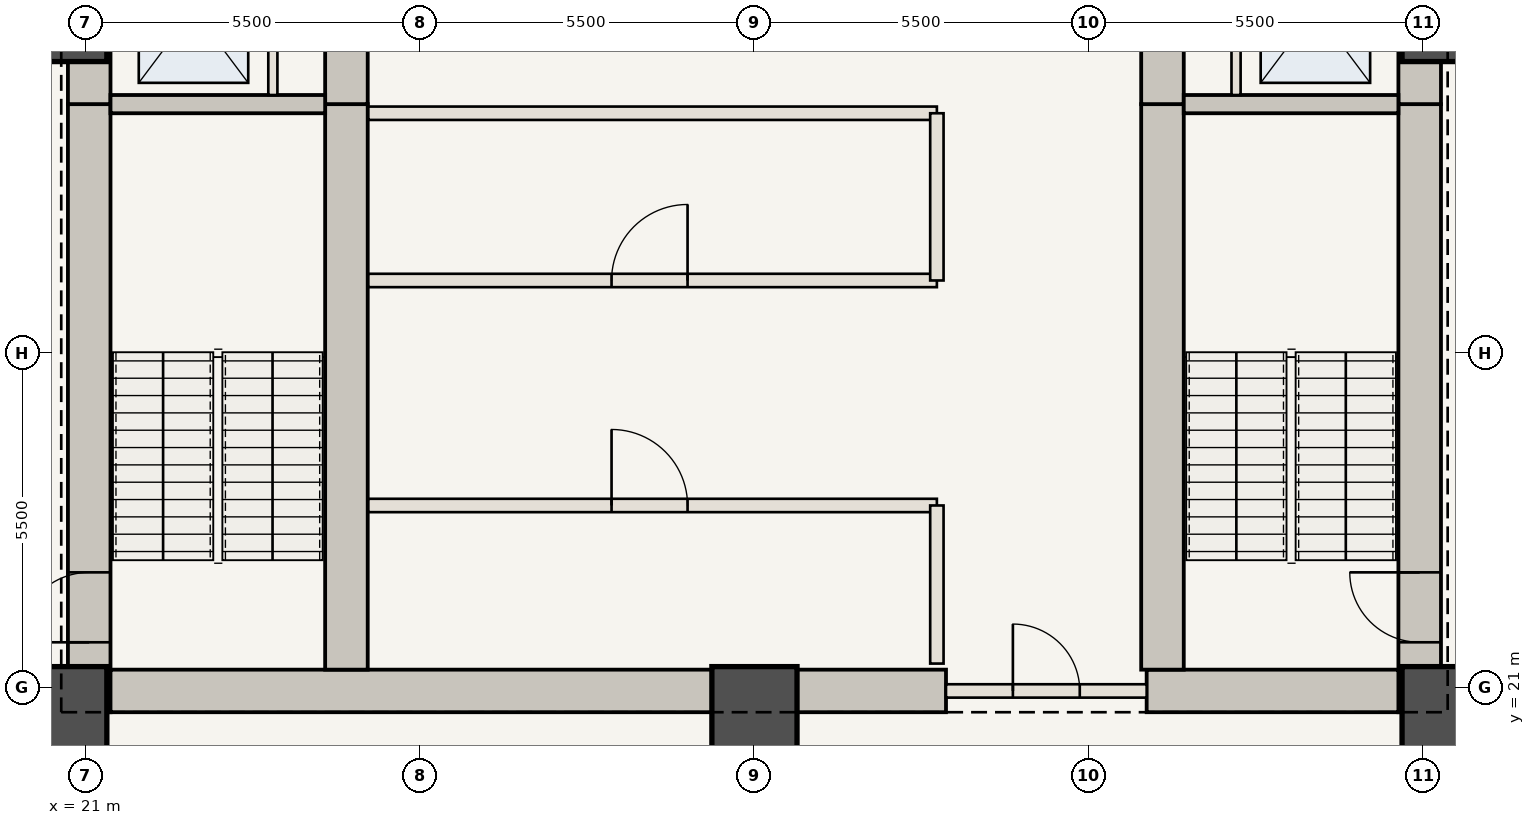
"""IFC4 building model, lengths in metres.
Left out: names, types, materials, properties, quantities, classifications, styles, units other than length and angle.
Written with IfcOpenShell. Run it as: python <this file> out.ifc"""

import sys

from ifc_helpers import new_model, si_unit, direction, frame, frame_2d, origin, origin_2d, place, context, subcontext, project, spatial, rectangle, extrude, element, fill, save


model = new_model("IFC4")
c1 = context("Model", 3, precision=1e-05, world=origin(), true_north=direction((0.0, 1.0)))
c2 = subcontext(c1, "Body", "Model", "MODEL_VIEW")
j1 = project(units=[si_unit("LENGTHUNIT", "METRE"), si_unit("PLANEANGLEUNIT", "RADIAN")], contexts=[c1])
p1 = place(None, origin())
s1 = spatial("IfcSite", under=j1, at=p1, CompositionType="ELEMENT")
p2 = place(p1, origin())
s2 = spatial("IfcBuilding", under=s1, at=p2, CompositionType="ELEMENT")
p3 = place(p2, frame((0.0, 0.0, -9.1)))
s3 = spatial("IfcBuildingStorey", under=s2, at=p3, CompositionType="ELEMENT", Elevation=-9.1)
p4 = place(p3, frame((21.06, 20.6, -0.6), z_axis=(0.0, 0.0, 1.0), x_axis=(0.0, 1.0, 0.0)))
e1 = element("IfcWall", 1, at=p4, inside=s3, PredefinedType="SHEAR", context=c2, shape_type="SweptSolid", body=[
    extrude(rectangle(XDim=10.0, YDim=0.7, at=frame_2d((5.0, 0.0))), origin(), (0.0, 0.0, 1.0), 5.15),
])
p5 = place(p4, frame((1.15, 0.0, 0.6)))
e2 = element("IfcOpeningElement", 2, at=p5, cuts=e1, PredefinedType="OPENING", context=c2, shape_type="SweptSolid", body=[
    extrude(rectangle(XDim=1.15, YDim=2.15, at=frame_2d((0.575, 1.075))), frame((0.0, 0.36, 0.0), z_axis=(0.0, -1.0, 0.0), x_axis=(1.0, 0.0, 0.0)), (0.0, 0.0, 1.0), 0.72),
])
p6 = place(p3, frame((21.06, 30.6, -0.6), z_axis=(0.0, 0.0, 1.0), x_axis=(0.0, 1.0, 0.0)))
e3 = element("IfcWall", 3, at=p6, inside=s3, PredefinedType="SHEAR", context=c2, shape_type="SweptSolid", body=[
    extrude(rectangle(XDim=12.75, YDim=0.7, at=frame_2d((6.375, 0.0))), origin(), (0.0, 0.0, 1.0), 5.15),
])
p7 = place(p6, frame((4.2, 0.0, 0.6)))
e4 = element("IfcOpeningElement", 4, at=p7, cuts=e3, PredefinedType="OPENING", context=c2, shape_type="SweptSolid", body=[
    extrude(rectangle(XDim=1.1, YDim=2.15, at=frame_2d((0.55, 1.075))), frame((0.0, 0.36, 0.0), z_axis=(0.0, -1.0, 0.0), x_axis=(1.0, 0.0, 0.0)), (0.0, 0.0, 1.0), 0.72),
])
p8 = place(p6, frame((9.2, 0.0, 0.6)))
e5 = element("IfcOpeningElement", 5, at=p8, cuts=e3, PredefinedType="OPENING", context=c2, shape_type="SweptSolid", body=[
    extrude(rectangle(XDim=0.92, YDim=2.1, at=frame_2d((0.46, 1.05))), frame((0.0, 0.36, 0.0), z_axis=(0.0, -1.0, 0.0), x_axis=(1.0, 0.0, 0.0)), (0.0, 0.0, 1.0), 0.72),
])
p9 = place(p3, frame((42.94, 20.6, -0.6), z_axis=(0.0, 0.0, 1.0), x_axis=(0.0, 1.0, 0.0)))
e6 = element("IfcWall", 6, at=p9, inside=s3, PredefinedType="SHEAR", context=c2, shape_type="SweptSolid", body=[
    extrude(rectangle(XDim=10.0, YDim=0.7, at=frame_2d((5.0, 0.0))), origin(), (0.0, 0.0, 1.0), 5.15),
])
p10 = place(p9, frame((1.15, 0.0, 0.6)))
e7 = element("IfcOpeningElement", 7, at=p10, cuts=e6, PredefinedType="OPENING", context=c2, shape_type="SweptSolid", body=[
    extrude(rectangle(XDim=1.15, YDim=2.15, at=frame_2d((0.575, 1.075))), frame((0.0, 0.36, 0.0), z_axis=(0.0, -1.0, 0.0), x_axis=(1.0, 0.0, 0.0)), (0.0, 0.0, 1.0), 0.72),
])
p11 = place(p3, frame((42.94, 30.6, -0.6), z_axis=(0.0, 0.0, 1.0), x_axis=(0.0, 1.0, 0.0)))
e8 = element("IfcWall", 8, at=p11, inside=s3, PredefinedType="SHEAR", context=c2, shape_type="SweptSolid", body=[
    extrude(rectangle(XDim=12.75, YDim=0.7, at=frame_2d((6.375, 0.0))), origin(), (0.0, 0.0, 1.0), 5.15),
])
p12 = place(p11, frame((4.2, 0.0, 0.6)))
e9 = element("IfcOpeningElement", 9, at=p12, cuts=e8, PredefinedType="OPENING", context=c2, shape_type="SweptSolid", body=[
    extrude(rectangle(XDim=1.1, YDim=2.15, at=frame_2d((0.55, 1.075))), frame((0.0, 0.36, 0.0), z_axis=(0.0, -1.0, 0.0), x_axis=(1.0, 0.0, 0.0)), (0.0, 0.0, 1.0), 0.72),
])
p13 = place(p11, frame((8.4, 0.0, 0.6)))
e10 = element("IfcOpeningElement", 10, at=p13, cuts=e8, PredefinedType="OPENING", context=c2, shape_type="SweptSolid", body=[
    extrude(rectangle(XDim=0.88, YDim=2.1, at=frame_2d((0.44, 1.05))), frame((0.0, 0.36, 0.0), z_axis=(0.0, -1.0, 0.0), x_axis=(1.0, 0.0, 0.0)), (0.0, 0.0, 1.0), 0.72),
])
p14 = place(p11, frame((10.5, 0.0, 0.6)))
e11 = element("IfcOpeningElement", 11, at=p14, cuts=e8, PredefinedType="OPENING", context=c2, shape_type="SweptSolid", body=[
    extrude(rectangle(XDim=0.88, YDim=2.1, at=frame_2d((0.44, 1.05))), frame((0.0, 0.36, 0.0), z_axis=(0.0, -1.0, 0.0), x_axis=(1.0, 0.0, 0.0)), (0.0, 0.0, 1.0), 0.72),
])
p15 = place(p3, frame((21.41, 20.95, -0.6), z_axis=(0.0, 0.0, 1.0), x_axis=(1.0, 0.0, 0.0)))
e12 = element("IfcWall", 12, at=p15, inside=s3, PredefinedType="SHEAR", context=c2, shape_type="SweptSolid", body=[
    extrude(rectangle(XDim=13.74, YDim=0.7, at=frame_2d((6.87, 0.0))), origin(), (0.0, 0.0, 1.0), 5.15),
])
p16 = place(p3, frame((38.45, 20.95, -0.6), z_axis=(0.0, 0.0, 1.0), x_axis=(1.0, 0.0, 0.0)))
e13 = element("IfcWall", 13, at=p16, inside=s3, PredefinedType="SHEAR", context=c2, shape_type="SweptSolid", body=[
    extrude(rectangle(XDim=4.14, YDim=0.7, at=frame_2d((2.07, 0.0))), origin(), (0.0, 0.0, 1.0), 5.15),
])
p17 = place(p3, frame((25.29, 21.3, -0.6), z_axis=(0.0, 0.0, 1.0), x_axis=(0.0, 1.0, 0.0)))
e14 = element("IfcWall", 14, at=p17, inside=s3, PredefinedType="SHEAR", context=c2, shape_type="SweptSolid", body=[
    extrude(rectangle(XDim=9.3, YDim=0.7, at=frame_2d((4.65, 0.0))), origin(), (0.0, 0.0, 1.0), 5.15),
])
p18 = place(p3, frame((25.29, 30.6, -0.6), z_axis=(0.0, 0.0, 1.0), x_axis=(0.0, 1.0, 0.0)))
e15 = element("IfcWall", 15, at=p18, inside=s3, PredefinedType="SHEAR", context=c2, shape_type="SweptSolid", body=[
    extrude(rectangle(XDim=12.05, YDim=0.7, at=frame_2d((6.025, 0.0))), origin(), (0.0, 0.0, 1.0), 5.15),
])
p19 = place(p18, frame((6.25, 0.0, 0.6)))
e16 = element("IfcOpeningElement", 16, at=p19, cuts=e15, PredefinedType="OPENING", context=c2, shape_type="SweptSolid", body=[
    extrude(rectangle(XDim=1.1, YDim=2.15, at=frame_2d((0.55, 1.075))), frame((0.0, 0.36, 0.0), z_axis=(0.0, -1.0, 0.0), x_axis=(1.0, 0.0, 0.0)), (0.0, 0.0, 1.0), 0.72),
])
p20 = place(p3, frame((38.71, 21.3, -0.6), z_axis=(0.0, 0.0, 1.0), x_axis=(0.0, 1.0, 0.0)))
e17 = element("IfcWall", 17, at=p20, inside=s3, PredefinedType="SHEAR", context=c2, shape_type="SweptSolid", body=[
    extrude(rectangle(XDim=9.3, YDim=0.7, at=frame_2d((4.65, 0.0))), origin(), (0.0, 0.0, 1.0), 5.15),
])
p21 = place(p3, frame((38.71, 30.6, -0.6), z_axis=(0.0, 0.0, 1.0), x_axis=(0.0, 1.0, 0.0)))
e18 = element("IfcWall", 18, at=p21, inside=s3, PredefinedType="SHEAR", context=c2, shape_type="SweptSolid", body=[
    extrude(rectangle(XDim=12.05, YDim=0.7, at=frame_2d((6.025, 0.0))), origin(), (0.0, 0.0, 1.0), 5.15),
])
for number, where, z_axis, x_axis in (
    (19, (20.65, 20.65, -0.6), (0.0, 0.0, 1.0), (1.0, 0.0, 0.0)),
    (20, (32.0, 20.65, -0.6), (0.0, 0.0, 1.0), (1.0, 0.0, 0.0)),
    (21, (43.35, 20.65, -0.6), (0.0, 0.0, 1.0), (1.0, 0.0, 0.0)),
    (22, (43.35, 32.0, -0.6), (0.0, 0.0, 1.0), (1.0, 0.0, 0.0)),
    (23, (20.65, 32.0, -0.6), (0.0, 0.0, 1.0), (1.0, 0.0, 0.0)),
):
    element("IfcColumn", number, at=place(p3, frame(where, z_axis=z_axis, x_axis=x_axis)), inside=s3, PredefinedType="COLUMN", context=c2, shape_type="SweptSolid", body=[
        extrude(rectangle(XDim=1.4, YDim=1.4, at=origin_2d()), origin(), (0.0, 0.0, 1.0), 5.15),
    ])
for number, where, z_axis, x_axis in (
    (24, (21.41, 30.6, 0.0), (0.0, 0.0, 1.0), (1.0, 0.0, 0.0)),
    (25, (39.06, 30.6, 0.0), (0.0, 0.0, 1.0), (1.0, 0.0, 0.0)),
):
    element("IfcWall", number, at=place(p3, frame(where, z_axis=z_axis, x_axis=x_axis)), inside=s3, PredefinedType="SHEAR", context=c2, shape_type="SweptSolid", body=[
        extrude(rectangle(XDim=3.53, YDim=0.3, at=frame_2d((1.765, 0.0))), origin(), (0.0, 0.0, 1.0), 4.25),
    ])
for number, where, z_axis, x_axis in (
    (26, (24.08, 30.75, 0.0), (0.0, 0.0, 1.0), (0.0, 1.0, 0.0)),
    (27, (39.92, 30.75, 0.0), (0.0, 0.0, 1.0), (0.0, 1.0, 0.0)),
):
    element("IfcWall", number, at=place(p3, frame(where, z_axis=z_axis, x_axis=x_axis)), inside=s3, PredefinedType="STANDARD", context=c2, shape_type="SweptSolid", body=[
        extrude(rectangle(XDim=2.65, YDim=0.15, at=frame_2d((1.325, 0.0))), origin(), (0.0, 0.0, 1.0), 4.25),
    ])
p22 = place(p3, frame((35.15, 20.95, 0.0), z_axis=(0.0, 0.0, 1.0), x_axis=(1.0, 0.0, 0.0)))
e28 = element("IfcWall", 28, at=p22, inside=s3, PredefinedType="STANDARD", context=c2, shape_type="SweptSolid", body=[
    extrude(rectangle(XDim=3.3, YDim=0.22, at=frame_2d((1.65, 0.0))), origin(), (0.0, 0.0, 1.0), 4.25),
])
p23 = place(p22, frame((1.1, 0.0, 0.0)))
e29 = element("IfcOpeningElement", 29, at=p23, cuts=e28, PredefinedType="OPENING", context=c2, shape_type="SweptSolid", body=[
    extrude(rectangle(XDim=1.1, YDim=2.15, at=frame_2d((0.55, 1.075))), frame((0.0, 0.12, 0.0), z_axis=(0.0, -1.0, 0.0), x_axis=(1.0, 0.0, 0.0)), (0.0, 0.0, 1.0), 0.24),
])
p24 = place(p3, frame((25.65, 24.0, 0.0), z_axis=(0.0, 0.0, 1.0), x_axis=(1.0, 0.0, 0.0)))
e30 = element("IfcWall", 30, at=p24, inside=s3, PredefinedType="STANDARD", context=c2, shape_type="SweptSolid", body=[
    extrude(rectangle(XDim=9.35, YDim=0.22, at=frame_2d((4.675, 0.0))), origin(), (0.0, 0.0, 1.0), 4.25),
])
p25 = place(p24, frame((4.0, 0.0, 0.0)))
e31 = element("IfcOpeningElement", 31, at=p25, cuts=e30, PredefinedType="OPENING", context=c2, shape_type="SweptSolid", body=[
    extrude(rectangle(XDim=1.25, YDim=2.2, at=frame_2d((0.625, 1.1))), frame((0.0, 0.12, 0.0), z_axis=(0.0, -1.0, 0.0), x_axis=(1.0, 0.0, 0.0)), (0.0, 0.0, 1.0), 0.24),
])
p26 = place(p3, frame((35.0, 21.4, 0.0), z_axis=(0.0, 0.0, 1.0), x_axis=(0.0, 1.0, 0.0)))
e32 = element("IfcWall", 32, at=p26, inside=s3, PredefinedType="STANDARD", context=c2, shape_type="SweptSolid", body=[
    extrude(rectangle(XDim=2.6, YDim=0.22, at=frame_2d((1.3, 0.0))), origin(), (0.0, 0.0, 1.0), 4.25),
])
p27 = place(p3, frame((25.65, 27.7, 0.0), z_axis=(0.0, 0.0, 1.0), x_axis=(1.0, 0.0, 0.0)))
e33 = element("IfcWall", 33, at=p27, inside=s3, PredefinedType="STANDARD", context=c2, shape_type="SweptSolid", body=[
    extrude(rectangle(XDim=9.35, YDim=0.22, at=frame_2d((4.675, 0.0))), origin(), (0.0, 0.0, 1.0), 4.25),
])
p28 = place(p27, frame((4.0, 0.0, 0.0)))
e34 = element("IfcOpeningElement", 34, at=p28, cuts=e33, PredefinedType="OPENING", context=c2, shape_type="SweptSolid", body=[
    extrude(rectangle(XDim=1.25, YDim=2.2, at=frame_2d((0.625, 1.1))), frame((0.0, 0.12, 0.0), z_axis=(0.0, -1.0, 0.0), x_axis=(1.0, 0.0, 0.0)), (0.0, 0.0, 1.0), 0.24),
])
p29 = place(p3, frame((25.65, 30.45, 0.0), z_axis=(0.0, 0.0, 1.0), x_axis=(1.0, 0.0, 0.0)))
e35 = element("IfcWall", 35, at=p29, inside=s3, PredefinedType="STANDARD", context=c2, shape_type="SweptSolid", body=[
    extrude(rectangle(XDim=9.35, YDim=0.22, at=frame_2d((4.675, 0.0))), origin(), (0.0, 0.0, 1.0), 4.25),
])
p30 = place(p3, frame((35.0, 27.7, 0.0), z_axis=(0.0, 0.0, 1.0), x_axis=(0.0, 1.0, 0.0)))
e36 = element("IfcWall", 36, at=p30, inside=s3, PredefinedType="STANDARD", context=c2, shape_type="SweptSolid", body=[
    extrude(rectangle(XDim=2.75, YDim=0.22, at=frame_2d((1.375, 0.0))), origin(), (0.0, 0.0, 1.0), 4.25),
])
p31 = place(p5, origin())
e37 = element("IfcDoor", 37, at=p31, inside=s3, OperationType="SINGLE_SWING_LEFT", PredefinedType="DOOR", context=c2, shape_type="SweptSolid", body=[
    extrude(rectangle(XDim=1.15, YDim=2.15, at=frame_2d((0.575, 1.075))), frame((0.0, 0.025, 0.0), z_axis=(0.0, -1.0, 0.0), x_axis=(1.0, 0.0, 0.0)), (0.0, 0.0, 1.0), 0.05),
])
fill(e2, e37)
p32 = place(p10, origin())
e38 = element("IfcDoor", 38, at=p32, inside=s3, OperationType="SINGLE_SWING_RIGHT", PredefinedType="DOOR", context=c2, shape_type="SweptSolid", body=[
    extrude(rectangle(XDim=1.15, YDim=2.15, at=frame_2d((0.575, 1.075))), frame((0.0, 0.025, 0.0), z_axis=(0.0, -1.0, 0.0), x_axis=(1.0, 0.0, 0.0)), (0.0, 0.0, 1.0), 0.05),
])
fill(e7, e38)
p33 = place(p23, origin())
e39 = element("IfcDoor", 39, at=p33, inside=s3, OperationType="SINGLE_SWING_LEFT", PredefinedType="DOOR", context=c2, shape_type="SweptSolid", body=[
    extrude(rectangle(XDim=1.1, YDim=2.15, at=frame_2d((0.55, 1.075))), frame((0.0, 0.025, 0.0), z_axis=(0.0, -1.0, 0.0), x_axis=(1.0, 0.0, 0.0)), (0.0, 0.0, 1.0), 0.05),
])
fill(e29, e39)
p34 = place(p25, origin())
e40 = element("IfcDoor", 40, at=p34, inside=s3, OperationType="SINGLE_SWING_LEFT", PredefinedType="DOOR", context=c2, shape_type="SweptSolid", body=[
    extrude(rectangle(XDim=1.25, YDim=2.2, at=frame_2d((0.625, 1.1))), frame((0.0, 0.025, 0.0), z_axis=(0.0, -1.0, 0.0), x_axis=(1.0, 0.0, 0.0)), (0.0, 0.0, 1.0), 0.05),
])
fill(e31, e40)
p35 = place(p28, origin())
e41 = element("IfcDoor", 41, at=p35, inside=s3, OperationType="SINGLE_SWING_RIGHT", PredefinedType="DOOR", context=c2, shape_type="SweptSolid", body=[
    extrude(rectangle(XDim=1.25, YDim=2.2, at=frame_2d((0.625, 1.1))), frame((0.0, 0.025, 0.0), z_axis=(0.0, -1.0, 0.0), x_axis=(1.0, 0.0, 0.0)), (0.0, 0.0, 1.0), 0.05),
])
fill(e34, e41)
save(model, sys.argv[1])
